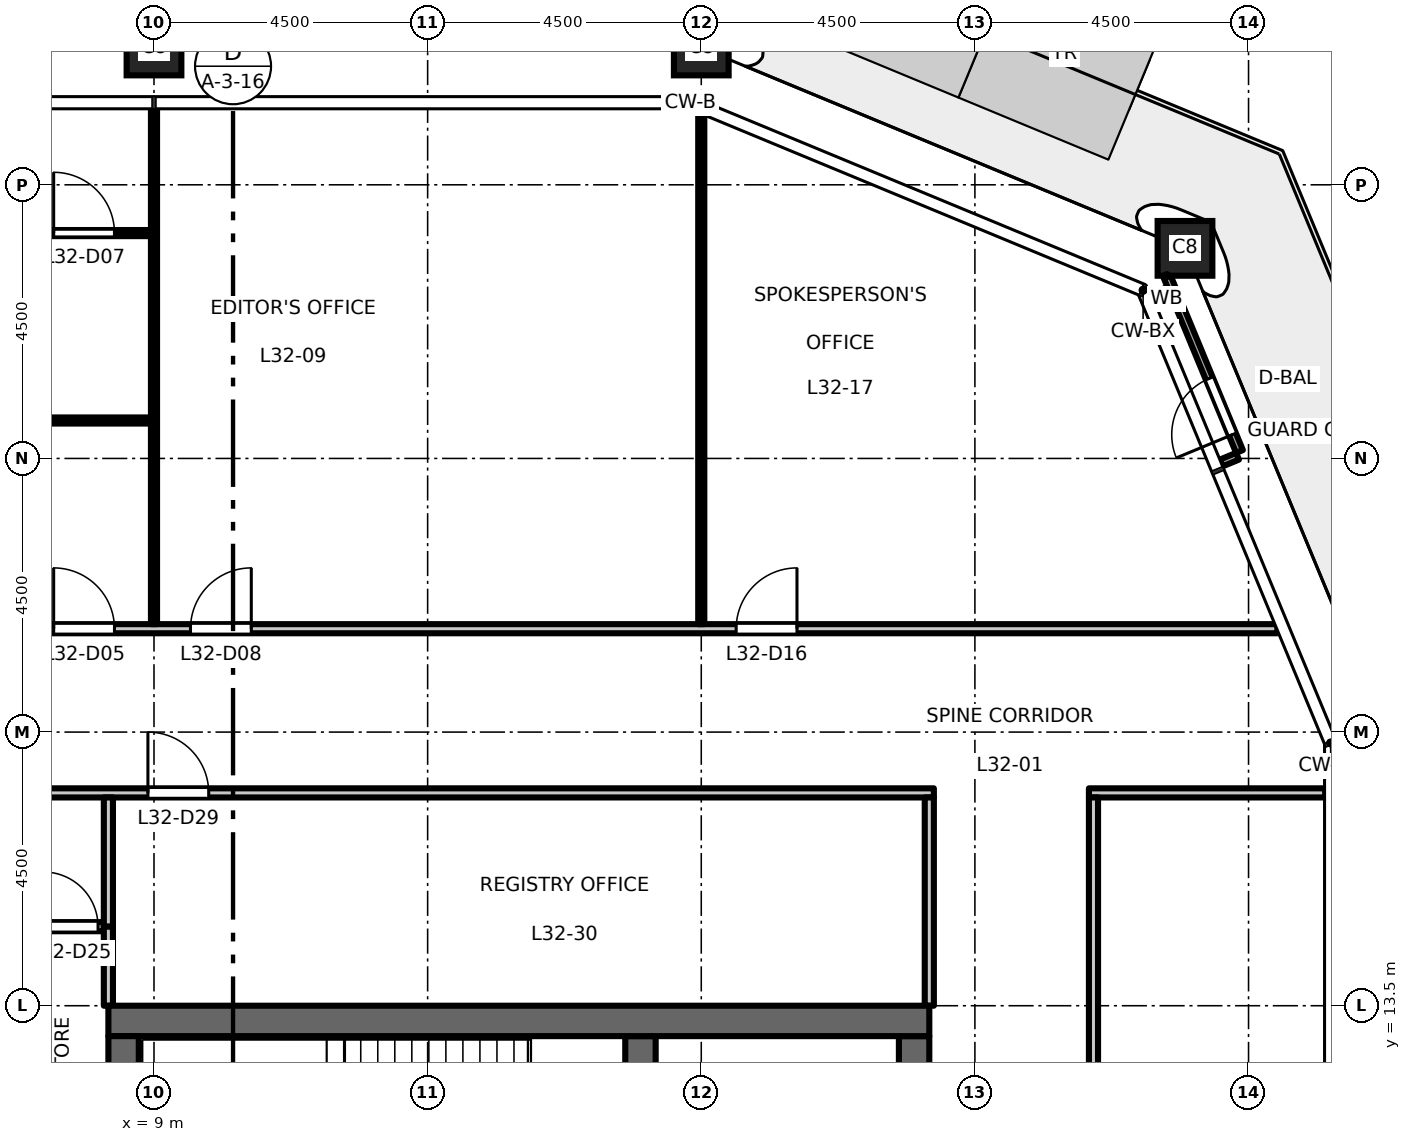
"""IFC4 building model, lengths in metres.
Left out: names, types, materials, properties, quantities, classifications, styles, units other than length and angle.
Written with IfcOpenShell. Run it as: python <this file> out.ifc"""

import sys

from ifc_helpers import new_model, si_unit, direction, frame, frame_2d, origin, origin_2d, place, context, subcontext, project, spatial, rectangle, hollow_rectangle, extrude, element, fill, save


model = new_model("IFC4")
c1 = context("Model", 3, precision=1e-05, world=origin(), true_north=direction((0.0, 1.0)))
c2 = subcontext(c1, "Body", "Model", "MODEL_VIEW")
j1 = project(units=[si_unit("LENGTHUNIT", "METRE"), si_unit("PLANEANGLEUNIT", "RADIAN")], contexts=[c1])
p1 = place(None, origin())
s1 = spatial("IfcSite", under=j1, at=p1, CompositionType="ELEMENT")
p2 = place(p1, origin())
s2 = spatial("IfcBuilding", under=s1, at=p2, CompositionType="ELEMENT")
p3 = place(p2, frame((0.0, 0.0, 149.7)))
s3 = spatial("IfcBuildingStorey", under=s2, at=p3, CompositionType="ELEMENT", Elevation=149.7)
for number, where, z_axis, x_axis in (
    (1, (25.955, 25.955, 0.0), (0.0, 0.0, 1.0), (1.0, 0.0, 0.0)),
    (2, (18.0, 29.25, 0.0), (0.0, 0.0, 1.0), (1.0, 0.0, 0.0)),
    (3, (9.0, 29.25, 0.0), (0.0, 0.0, 1.0), (1.0, 0.0, 0.0)),
):
    element("IfcColumn", number, at=place(p3, frame(where, z_axis=z_axis, x_axis=x_axis)), inside=s3, PredefinedType="COLUMN", context=c2, shape_type="SweptSolid", body=[
        extrude(hollow_rectangle(XDim=0.9, YDim=0.9, WallThickness=0.05, at=origin_2d()), origin(), (0.0, 0.0, 1.0), 4.5),
    ])
p4 = place(p3, frame((21.5, -13.0, 0.0), z_axis=(0.0, 0.0, 1.0), x_axis=(0.0, 1.0, 0.0)))
e4 = element("IfcWall", 4, at=p4, inside=s3, PredefinedType="SHEAR", context=c2, shape_type="SweptSolid", body=[
    extrude(rectangle(XDim=26.0, YDim=0.5, at=frame_2d((13.0, 0.0))), origin(), (0.0, 0.0, 1.0), 4.35),
])
p5 = place(p4, frame((16.825, 0.0, 0.0)))
e5 = element("IfcOpeningElement", 5, at=p5, cuts=e4, PredefinedType="OPENING", context=c2, shape_type="SweptSolid", body=[
    extrude(rectangle(XDim=1.8, YDim=2.1, at=frame_2d((0.9, 1.05))), frame((0.0, 0.26, 0.0), z_axis=(0.0, -1.0, 0.0), x_axis=(1.0, 0.0, 0.0)), (0.0, 0.0, 1.0), 0.52),
])
p6 = place(p4, frame((7.375, 0.0, 0.0)))
e6 = element("IfcOpeningElement", 6, at=p6, cuts=e4, PredefinedType="OPENING", context=c2, shape_type="SweptSolid", body=[
    extrude(rectangle(XDim=1.8, YDim=2.1, at=frame_2d((0.9, 1.05))), frame((0.0, 0.26, 0.0), z_axis=(0.0, -1.0, 0.0), x_axis=(1.0, 0.0, 0.0)), (0.0, 0.0, 1.0), 0.52),
])
p7 = place(p4, frame((23.8, 0.0, 0.0)))
e7 = element("IfcOpeningElement", 7, at=p7, cuts=e4, PredefinedType="OPENING", context=c2, shape_type="SweptSolid", body=[
    extrude(rectangle(XDim=0.9, YDim=2.1, at=frame_2d((0.45, 1.05))), frame((0.0, 0.26, 0.0), z_axis=(0.0, -1.0, 0.0), x_axis=(1.0, 0.0, 0.0)), (0.0, 0.0, 1.0), 0.52),
])
p8 = place(p3, frame((17.0, 6.425, 0.0), z_axis=(0.0, 0.0, 1.0), x_axis=(0.0, 1.0, 0.0)))
e8 = element("IfcWall", 8, at=p8, inside=s3, PredefinedType="SHEAR", context=c2, shape_type="SweptSolid", body=[
    extrude(rectangle(XDim=6.575, YDim=0.5, at=frame_2d((3.288, 0.0))), origin(), (0.0, 0.0, 1.0), 4.35),
])
p9 = place(p3, frame((8.25, 13.25, 0.0), z_axis=(0.0, 0.0, 1.0), x_axis=(1.0, 0.0, 0.0)))
e9 = element("IfcWall", 9, at=p9, inside=s3, PredefinedType="SHEAR", context=c2, shape_type="SweptSolid", body=[
    extrude(rectangle(XDim=13.5, YDim=0.5, at=frame_2d((6.75, 0.0))), origin(), (0.0, 0.0, 1.0), 4.35),
])
p10 = place(p3, frame((8.5, -13.0, 0.0), z_axis=(0.0, 0.0, 1.0), x_axis=(0.0, 1.0, 0.0)))
e10 = element("IfcWall", 10, at=p10, inside=s3, PredefinedType="SHEAR", context=c2, shape_type="SweptSolid", body=[
    extrude(rectangle(XDim=26.0, YDim=0.5, at=frame_2d((13.0, 0.0))), origin(), (0.0, 0.0, 1.0), 4.35),
])
for number, where, z_axis, x_axis in (
    (11, (26.551, 22.425, 0.0), (0.0, 0.0, 1.0), (0.924, 0.382, 0.0)),
    (12, (25.421, 25.153, 0.0), (0.0, 0.0, 1.0), (0.924, 0.383, 0.0)),
):
    element("IfcWall", number, at=place(p3, frame(where, z_axis=z_axis, x_axis=x_axis)), inside=s3, PredefinedType="STANDARD", context=c2, shape_type="SweptSolid", body=[
        extrude(rectangle(XDim=0.29, YDim=0.12, at=frame_2d((0.145, 0.0))), origin(), (0.0, 0.0, 1.0), 4.35),
    ])
p11 = place(p3, frame((26.852, 22.615, 0.0), z_axis=(0.0, 0.0, 1.0), x_axis=(-0.382691800707, 0.923876066186, 0.0)))
e13 = element("IfcWall", 13, at=p11, inside=s3, PredefinedType="STANDARD", context=c2, shape_type="SweptSolid", body=[
    extrude(rectangle(XDim=3.128, YDim=0.12, at=frame_2d((1.564, 0.0))), origin(), (0.0, 0.0, 1.0), 4.35),
])
p12 = place(p11, frame((0.3, 0.0, 0.0)))
e14 = element("IfcOpeningElement", 14, at=p12, cuts=e13, PredefinedType="OPENING", context=c2, shape_type="SweptSolid", body=[
    extrude(rectangle(XDim=1.0, YDim=2.4, at=frame_2d((0.5, 1.2))), frame((0.0, 0.07, 0.0), z_axis=(0.0, -1.0, 0.0), x_axis=(1.0, 0.0, 0.0)), (0.0, 0.0, 1.0), 0.14),
])
p13 = place(p3, frame((6.78, 14.8, 0.0), z_axis=(0.0, 0.0, 1.0), x_axis=(1.0, 0.0, 0.0)))
e15 = element("IfcWall", 15, at=p13, inside=s3, PredefinedType="PARTITIONING", context=c2, shape_type="SweptSolid", body=[
    extrude(rectangle(XDim=1.395, YDim=0.15, at=frame_2d((0.698, 0.0))), origin(), (0.0, 0.0, 1.0), 4.35),
])
p14 = place(p13, frame((0.4, 0.0, 0.0)))
e16 = element("IfcOpeningElement", 16, at=p14, cuts=e15, PredefinedType="OPENING", context=c2, shape_type="SweptSolid", body=[
    extrude(rectangle(XDim=0.9, YDim=2.1, at=frame_2d((0.45, 1.05))), frame((0.0, 0.085, 0.0), z_axis=(0.0, -1.0, 0.0), x_axis=(1.0, 0.0, 0.0)), (0.0, 0.0, 1.0), 0.17),
])
p15 = place(p3, frame((-21.825, 17.0, 0.0), z_axis=(0.0, 0.0, 1.0), x_axis=(1.0, 0.0, 0.0)))
e17 = element("IfcWall", 17, at=p15, inside=s3, PredefinedType="PARTITIONING", context=c2, shape_type="SweptSolid", body=[
    extrude(rectangle(XDim=43.65, YDim=0.15, at=frame_2d((21.825, 0.0))), origin(), (0.0, 0.0, 1.0), 4.35),
])
p16 = place(p15, frame((14.225, 0.0, 0.0)))
e18 = element("IfcOpeningElement", 18, at=p16, cuts=e17, PredefinedType="OPENING", context=c2, shape_type="SweptSolid", body=[
    extrude(rectangle(XDim=1.0, YDim=2.1, at=frame_2d((0.5, 1.05))), frame((0.0, 0.085, 0.0), z_axis=(0.0, -1.0, 0.0), x_axis=(1.0, 0.0, 0.0)), (0.0, 0.0, 1.0), 0.17),
])
p17 = place(p15, frame((11.975, 0.0, 0.0)))
e19 = element("IfcOpeningElement", 19, at=p17, cuts=e17, PredefinedType="OPENING", context=c2, shape_type="SweptSolid", body=[
    extrude(rectangle(XDim=1.0, YDim=2.1, at=frame_2d((0.5, 1.05))), frame((0.0, 0.085, 0.0), z_axis=(0.0, -1.0, 0.0), x_axis=(1.0, 0.0, 0.0)), (0.0, 0.0, 1.0), 0.17),
])
p18 = place(p15, frame((30.725, 0.0, 0.0)))
e20 = element("IfcOpeningElement", 20, at=p18, cuts=e17, PredefinedType="OPENING", context=c2, shape_type="SweptSolid", body=[
    extrude(rectangle(XDim=1.0, YDim=2.1, at=frame_2d((0.5, 1.05))), frame((0.0, 0.085, 0.0), z_axis=(0.0, -1.0, 0.0), x_axis=(1.0, 0.0, 0.0)), (0.0, 0.0, 1.0), 0.17),
])
p19 = place(p3, frame((24.375, 17.0, 0.0), z_axis=(0.0, 0.0, 1.0), x_axis=(1.0, 0.0, 0.0)))
e21 = element("IfcWall", 21, at=p19, inside=s3, PredefinedType="PARTITIONING", context=c2, shape_type="SweptSolid", body=[
    extrude(rectangle(XDim=3.885, YDim=0.15, at=frame_2d((1.942, 0.0))), origin(), (0.0, 0.0, 1.0), 4.35),
])
p20 = place(p3, frame((-27.474, 19.7, 0.0), z_axis=(0.0, 0.0, 1.0), x_axis=(1.0, 0.0, 0.0)))
e22 = element("IfcWall", 22, at=p20, inside=s3, PredefinedType="PARTITIONING", context=c2, shape_type="SweptSolid", body=[
    extrude(rectangle(XDim=54.948, YDim=0.15, at=frame_2d((27.474, 0.0))), origin(), (0.0, 0.0, 1.0), 4.35),
])
p21 = place(p20, frame((16.824, 0.0, 0.0)))
e23 = element("IfcOpeningElement", 23, at=p21, cuts=e22, PredefinedType="OPENING", context=c2, shape_type="SweptSolid", body=[
    extrude(rectangle(XDim=1.0, YDim=2.1, at=frame_2d((0.5, 1.05))), frame((0.0, 0.085, 0.0), z_axis=(0.0, -1.0, 0.0), x_axis=(1.0, 0.0, 0.0)), (0.0, 0.0, 1.0), 0.17),
])
p22 = place(p20, frame((19.074, 0.0, 0.0)))
e24 = element("IfcOpeningElement", 24, at=p22, cuts=e22, PredefinedType="OPENING", context=c2, shape_type="SweptSolid", body=[
    extrude(rectangle(XDim=1.0, YDim=2.1, at=frame_2d((0.5, 1.05))), frame((0.0, 0.085, 0.0), z_axis=(0.0, -1.0, 0.0), x_axis=(1.0, 0.0, 0.0)), (0.0, 0.0, 1.0), 0.17),
])
p23 = place(p20, frame((34.824, 0.0, 0.0)))
e25 = element("IfcOpeningElement", 25, at=p23, cuts=e22, PredefinedType="OPENING", context=c2, shape_type="SweptSolid", body=[
    extrude(rectangle(XDim=1.0, YDim=2.1, at=frame_2d((0.5, 1.05))), frame((0.0, 0.085, 0.0), z_axis=(0.0, -1.0, 0.0), x_axis=(1.0, 0.0, 0.0)), (0.0, 0.0, 1.0), 0.17),
])
p24 = place(p20, frame((37.074, 0.0, 0.0)))
e26 = element("IfcOpeningElement", 26, at=p24, cuts=e22, PredefinedType="OPENING", context=c2, shape_type="SweptSolid", body=[
    extrude(rectangle(XDim=1.0, YDim=2.1, at=frame_2d((0.5, 1.05))), frame((0.0, 0.085, 0.0), z_axis=(0.0, -1.0, 0.0), x_axis=(1.0, 0.0, 0.0)), (0.0, 0.0, 1.0), 0.17),
])
p25 = place(p20, frame((7.824, 0.0, 0.0)))
e27 = element("IfcOpeningElement", 27, at=p25, cuts=e22, PredefinedType="OPENING", context=c2, shape_type="SweptSolid", body=[
    extrude(rectangle(XDim=1.0, YDim=2.1, at=frame_2d((0.5, 1.05))), frame((0.0, 0.085, 0.0), z_axis=(0.0, -1.0, 0.0), x_axis=(1.0, 0.0, 0.0)), (0.0, 0.0, 1.0), 0.17),
])
p26 = place(p20, frame((46.048, 0.0, 0.0)))
e28 = element("IfcOpeningElement", 28, at=p26, cuts=e22, PredefinedType="OPENING", context=c2, shape_type="SweptSolid", body=[
    extrude(rectangle(XDim=1.0, YDim=2.1, at=frame_2d((0.5, 1.05))), frame((0.0, 0.085, 0.0), z_axis=(0.0, -1.0, 0.0), x_axis=(1.0, 0.0, 0.0)), (0.0, 0.0, 1.0), 0.17),
])
p27 = place(p3, frame((0.05, 23.124, 0.0), z_axis=(0.0, 0.0, 1.0), x_axis=(1.0, 0.0, 0.0)))
e29 = element("IfcWall", 29, at=p27, inside=s3, PredefinedType="PARTITIONING", context=c2, shape_type="SweptSolid", body=[
    extrude(rectangle(XDim=8.9, YDim=0.1, at=frame_2d((4.45, 0.0))), origin(), (0.0, 0.0, 1.0), 4.35),
])
p28 = place(p27, frame((0.55, 0.0, 0.0)))
e30 = element("IfcOpeningElement", 30, at=p28, cuts=e29, PredefinedType="OPENING", context=c2, shape_type="SweptSolid", body=[
    extrude(rectangle(XDim=1.0, YDim=2.1, at=frame_2d((0.5, 1.05))), frame((0.0, 0.06, 0.0), z_axis=(0.0, -1.0, 0.0), x_axis=(1.0, 0.0, 0.0)), (0.0, 0.0, 1.0), 0.12),
])
p29 = place(p3, frame((0.05, 26.206, 0.0), z_axis=(0.0, 0.0, 1.0), x_axis=(1.0, 0.0, 0.0)))
e31 = element("IfcWall", 31, at=p29, inside=s3, PredefinedType="PARTITIONING", context=c2, shape_type="SweptSolid", body=[
    extrude(rectangle(XDim=8.9, YDim=0.1, at=frame_2d((4.45, 0.0))), origin(), (0.0, 0.0, 1.0), 4.35),
])
p30 = place(p29, frame((7.3, 0.0, 0.0)))
e32 = element("IfcOpeningElement", 32, at=p30, cuts=e31, PredefinedType="OPENING", context=c2, shape_type="SweptSolid", body=[
    extrude(rectangle(XDim=1.0, YDim=2.1, at=frame_2d((0.5, 1.05))), frame((0.0, 0.06, 0.0), z_axis=(0.0, -1.0, 0.0), x_axis=(1.0, 0.0, 0.0)), (0.0, 0.0, 1.0), 0.12),
])
p31 = place(p3, frame((8.25, 14.8, 0.0), z_axis=(0.0, 0.0, 1.0), x_axis=(0.0, 1.0, 0.0)))
e33 = element("IfcWall", 33, at=p31, inside=s3, PredefinedType="PARTITIONING", context=c2, shape_type="SweptSolid", body=[
    extrude(rectangle(XDim=2.125, YDim=0.15, at=frame_2d((1.062, 0.0))), origin(), (0.0, 0.0, 1.0), 4.35),
])
p32 = place(p3, frame((8.25, 13.5, 0.0), z_axis=(0.0, 0.0, 1.0), x_axis=(0.0, 1.0, 0.0)))
e34 = element("IfcWall", 34, at=p32, inside=s3, PredefinedType="PARTITIONING", context=c2, shape_type="SweptSolid", body=[
    extrude(rectangle(XDim=1.3, YDim=0.15, at=frame_2d((0.65, 0.0))), origin(), (0.0, 0.0, 1.0), 4.35),
])
p33 = place(p3, frame((9.0, 19.775, 0.0), z_axis=(0.0, 0.0, 1.0), x_axis=(0.0, 1.0, 0.0)))
e35 = element("IfcWall", 35, at=p33, inside=s3, PredefinedType="PARTITIONING", context=c2, shape_type="SweptSolid", body=[
    extrude(rectangle(XDim=8.485, YDim=0.1, at=frame_2d((4.243, 0.0))), origin(), (0.0, 0.0, 1.0), 3.45),
])
p34 = place(p3, frame((18.0, 19.775, 0.0), z_axis=(0.0, 0.0, 1.0), x_axis=(0.0, 1.0, 0.0)))
e36 = element("IfcWall", 36, at=p34, inside=s3, PredefinedType="PARTITIONING", context=c2, shape_type="SweptSolid", body=[
    extrude(rectangle(XDim=8.403, YDim=0.1, at=frame_2d((4.202, 0.0))), origin(), (0.0, 0.0, 1.0), 3.45),
])
p35 = place(p3, frame((21.75, 13.5, 0.0), z_axis=(0.0, 0.0, 1.0), x_axis=(0.0, 1.0, 0.0)))
e37 = element("IfcWall", 37, at=p35, inside=s3, PredefinedType="PARTITIONING", context=c2, shape_type="SweptSolid", body=[
    extrude(rectangle(XDim=3.425, YDim=0.15, at=frame_2d((1.712, 0.0))), origin(), (0.0, 0.0, 1.0), 4.35),
])
p36 = place(p3, frame((24.45, -16.925, 0.0), z_axis=(0.0, 0.0, 1.0), x_axis=(0.0, 1.0, 0.0)))
e38 = element("IfcWall", 38, at=p36, inside=s3, PredefinedType="PARTITIONING", context=c2, shape_type="SweptSolid", body=[
    extrude(rectangle(XDim=33.85, YDim=0.15, at=frame_2d((16.925, 0.0))), origin(), (0.0, 0.0, 1.0), 4.35),
])
p37 = place(p36, frame((0.575, 0.0, 0.0)))
e39 = element("IfcOpeningElement", 39, at=p37, cuts=e38, PredefinedType="OPENING", context=c2, shape_type="SweptSolid", body=[
    extrude(rectangle(XDim=1.0, YDim=2.1, at=frame_2d((0.5, 1.05))), frame((0.0, 0.085, 0.0), z_axis=(0.0, -1.0, 0.0), x_axis=(1.0, 0.0, 0.0)), (0.0, 0.0, 1.0), 0.17),
])
p38 = place(p12, origin())
e40 = element("IfcDoor", 40, at=p38, inside=s3, OperationType="SINGLE_SWING_LEFT", PredefinedType="DOOR", context=c2, shape_type="SweptSolid", body=[
    extrude(rectangle(XDim=1.0, YDim=2.4, at=frame_2d((0.5, 1.2))), frame((0.0, 0.025, 0.0), z_axis=(0.0, -1.0, 0.0), x_axis=(1.0, 0.0, 0.0)), (0.0, 0.0, 1.0), 0.05),
])
fill(e14, e40)
p39 = place(p23, origin())
e41 = element("IfcDoor", 41, at=p39, inside=s3, OperationType="SINGLE_SWING_LEFT", PredefinedType="DOOR", context=c2, shape_type="SweptSolid", body=[
    extrude(rectangle(XDim=1.0, YDim=2.1, at=frame_2d((0.5, 1.05))), frame((0.0, 0.025, 0.0), z_axis=(0.0, -1.0, 0.0), x_axis=(1.0, 0.0, 0.0)), (0.0, 0.0, 1.0), 0.05),
])
fill(e25, e41)
p40 = place(p30, origin())
e42 = element("IfcDoor", 42, at=p40, inside=s3, OperationType="SINGLE_SWING_LEFT", PredefinedType="DOOR", context=c2, shape_type="SweptSolid", body=[
    extrude(rectangle(XDim=1.0, YDim=2.1, at=frame_2d((0.5, 1.05))), frame((0.0, 0.025, 0.0), z_axis=(0.0, -1.0, 0.0), x_axis=(1.0, 0.0, 0.0)), (0.0, 0.0, 1.0), 0.05),
])
fill(e32, e42)
p41 = place(p24, origin())
e43 = element("IfcDoor", 43, at=p41, inside=s3, OperationType="SINGLE_SWING_RIGHT", PredefinedType="DOOR", context=c2, shape_type="SweptSolid", body=[
    extrude(rectangle(XDim=1.0, YDim=2.1, at=frame_2d((0.5, 1.05))), frame((0.0, 0.025, 0.0), z_axis=(0.0, -1.0, 0.0), x_axis=(1.0, 0.0, 0.0)), (0.0, 0.0, 1.0), 0.05),
])
fill(e26, e43)
p42 = place(p26, origin())
e44 = element("IfcDoor", 44, at=p42, inside=s3, OperationType="SINGLE_SWING_RIGHT", PredefinedType="DOOR", context=c2, shape_type="SweptSolid", body=[
    extrude(rectangle(XDim=1.0, YDim=2.1, at=frame_2d((0.5, 1.05))), frame((0.0, 0.025, 0.0), z_axis=(0.0, -1.0, 0.0), x_axis=(1.0, 0.0, 0.0)), (0.0, 0.0, 1.0), 0.05),
])
fill(e28, e44)
p43 = place(p14, origin())
e45 = element("IfcDoor", 45, at=p43, inside=s3, OperationType="SINGLE_SWING_LEFT", PredefinedType="DOOR", context=c2, shape_type="SweptSolid", body=[
    extrude(rectangle(XDim=0.9, YDim=2.1, at=frame_2d((0.45, 1.05))), frame((0.0, 0.025, 0.0), z_axis=(0.0, -1.0, 0.0), x_axis=(1.0, 0.0, 0.0)), (0.0, 0.0, 1.0), 0.05),
])
fill(e16, e45)
p44 = place(p18, origin())
e46 = element("IfcDoor", 46, at=p44, inside=s3, OperationType="SINGLE_SWING_LEFT", PredefinedType="DOOR", context=c2, shape_type="SweptSolid", body=[
    extrude(rectangle(XDim=1.0, YDim=2.1, at=frame_2d((0.5, 1.05))), frame((0.0, 0.025, 0.0), z_axis=(0.0, -1.0, 0.0), x_axis=(1.0, 0.0, 0.0)), (0.0, 0.0, 1.0), 0.05),
])
fill(e20, e46)
save(model, sys.argv[1])
